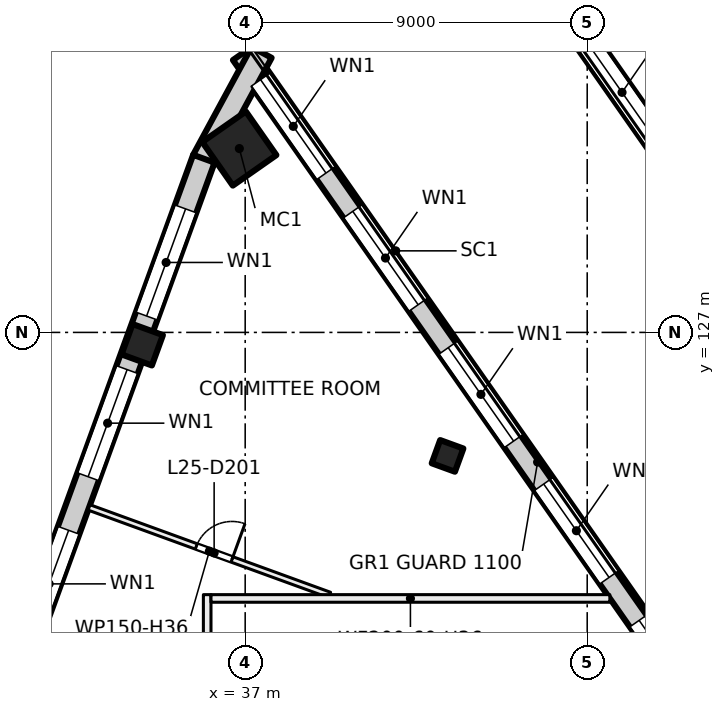
"""IFC4 building model, lengths in metres.
Left out: names, types, materials, properties, quantities, classifications, styles, units other than length and angle.
Written with IfcOpenShell. Run it as: python <this file> out.ifc"""

import sys

from ifc_helpers import new_model, si_unit, direction, frame, frame_2d, origin, origin_2d, place, context, subcontext, project, spatial, rectangle, hollow_rectangle, extrude, element, fill, save


model = new_model("IFC4")
c1 = context("Model", 3, precision=1e-05, world=origin(), true_north=direction((0.0, 1.0)))
c2 = subcontext(c1, "Body", "Model", "MODEL_VIEW")
j1 = project(units=[si_unit("LENGTHUNIT", "METRE"), si_unit("PLANEANGLEUNIT", "RADIAN")], contexts=[c1])
p1 = place(None, origin())
s1 = spatial("IfcSite", under=j1, at=p1, CompositionType="ELEMENT")
p2 = place(p1, origin())
s2 = spatial("IfcBuilding", under=s1, at=p2, CompositionType="ELEMENT")
p3 = place(p2, frame((0.0, 0.0, 109.0)))
s3 = spatial("IfcBuildingStorey", under=s2, at=p3, CompositionType="ELEMENT", Elevation=109.0)
p4 = place(p3, frame((36.846, 131.838, 0.0), z_axis=(0.0, 0.0, 1.0), x_axis=(0.573576436351, -0.819152044289, 0.0)))
e1 = element("IfcColumn", 1, at=p4, inside=s3, PredefinedType="COLUMN", context=c2, shape_type="SweptSolid", body=[
    extrude(hollow_rectangle(XDim=1.4, YDim=1.4, WallThickness=0.04, at=origin_2d()), origin(), (0.0, 0.0, 1.0), 4.0),
])
p5 = place(p3, frame((42.325, 123.751, 0.0), z_axis=(0.0, 0.0, 1.0), x_axis=(-0.342020143326, -0.939692620786, 0.0)))
e2 = element("IfcColumn", 2, at=p5, inside=s3, PredefinedType="COLUMN", context=c2, shape_type="SweptSolid", body=[
    extrude(rectangle(XDim=0.65, YDim=0.65, at=origin_2d()), origin(), (0.0, 0.0, 1.0), 4.0),
])
p6 = place(p3, frame((34.291, 126.675, 0.0), z_axis=(0.0, 0.0, 1.0), x_axis=(-0.342020143326, -0.939692620786, 0.0)))
e3 = element("IfcColumn", 3, at=p6, inside=s3, PredefinedType="COLUMN", context=c2, shape_type="SweptSolid", body=[
    extrude(rectangle(XDim=0.85, YDim=0.85, at=origin_2d()), origin(), (0.0, 0.0, 1.0), 4.0),
])
p7 = place(p3, frame((58.083, 117.369, 0.0), z_axis=(0.0, 0.0, 1.0), x_axis=(-0.573573095716, 0.819154383416, 0.0)))
e4 = element("IfcWall", 4, at=p7, inside=s3, PredefinedType="SOLIDWALL", context=c2, shape_type="SweptSolid", body=[
    extrude(rectangle(XDim=26.037, YDim=0.6, at=frame_2d((13.019, 0.0))), origin(), (0.0, 0.0, 1.0), 3.625),
])
p8 = place(p7, frame((0.6, 0.0, 0.9)))
e5 = element("IfcOpeningElement", 5, at=p8, cuts=e4, PredefinedType="OPENING", context=c2, shape_type="SweptSolid", body=[
    extrude(rectangle(XDim=3.0, YDim=2.4, at=frame_2d((1.5, 1.2))), frame((0.0, 0.31, 0.0), z_axis=(0.0, -1.0, 0.0), x_axis=(1.0, 0.0, 0.0)), (0.0, 0.0, 1.0), 0.62),
])
p9 = place(p7, frame((4.829, 0.0, 0.9)))
e6 = element("IfcOpeningElement", 6, at=p9, cuts=e4, PredefinedType="OPENING", context=c2, shape_type="SweptSolid", body=[
    extrude(rectangle(XDim=3.0, YDim=2.4, at=frame_2d((1.5, 1.2))), frame((0.0, 0.31, 0.0), z_axis=(0.0, -1.0, 0.0), x_axis=(1.0, 0.0, 0.0)), (0.0, 0.0, 1.0), 0.62),
])
p10 = place(p7, frame((9.209, 0.0, 0.9)))
e7 = element("IfcOpeningElement", 7, at=p10, cuts=e4, PredefinedType="OPENING", context=c2, shape_type="SweptSolid", body=[
    extrude(rectangle(XDim=3.0, YDim=2.4, at=frame_2d((1.5, 1.2))), frame((0.0, 0.31, 0.0), z_axis=(0.0, -1.0, 0.0), x_axis=(1.0, 0.0, 0.0)), (0.0, 0.0, 1.0), 0.62),
])
p11 = place(p7, frame((13.588, 0.0, 0.9)))
e8 = element("IfcOpeningElement", 8, at=p11, cuts=e4, PredefinedType="OPENING", context=c2, shape_type="SweptSolid", body=[
    extrude(rectangle(XDim=3.0, YDim=2.4, at=frame_2d((1.5, 1.2))), frame((0.0, 0.31, 0.0), z_axis=(0.0, -1.0, 0.0), x_axis=(1.0, 0.0, 0.0)), (0.0, 0.0, 1.0), 0.62),
])
p12 = place(p7, frame((17.968, 0.0, 0.9)))
e9 = element("IfcOpeningElement", 9, at=p12, cuts=e4, PredefinedType="OPENING", context=c2, shape_type="SweptSolid", body=[
    extrude(rectangle(XDim=3.0, YDim=2.4, at=frame_2d((1.5, 1.2))), frame((0.0, 0.31, 0.0), z_axis=(0.0, -1.0, 0.0), x_axis=(1.0, 0.0, 0.0)), (0.0, 0.0, 1.0), 0.62),
])
p13 = place(p7, frame((22.198, 0.0, 0.9)))
e10 = element("IfcOpeningElement", 10, at=p13, cuts=e4, PredefinedType="OPENING", context=c2, shape_type="SweptSolid", body=[
    extrude(rectangle(XDim=3.0, YDim=2.4, at=frame_2d((1.5, 1.2))), frame((0.0, 0.31, 0.0), z_axis=(0.0, -1.0, 0.0), x_axis=(1.0, 0.0, 0.0)), (0.0, 0.0, 1.0), 0.62),
])
p14 = place(p3, frame((36.923, 134.338, 0.0), z_axis=(0.0, 0.0, 1.0), x_axis=(0.573575266068, -0.819152863729, 0.0)))
e11 = element("IfcWall", 11, at=p14, inside=s3, PredefinedType="SOLIDWALL", context=c2, shape_type="SweptSolid", body=[
    extrude(rectangle(XDim=26.117, YDim=0.6, at=frame_2d((13.059, 0.0))), origin(), (0.0, 0.0, 1.0), 3.625),
])
p15 = place(p14, frame((0.84, 0.0, 0.9)))
e12 = element("IfcOpeningElement", 12, at=p15, cuts=e11, PredefinedType="OPENING", context=c2, shape_type="SweptSolid", body=[
    extrude(rectangle(XDim=3.0, YDim=2.4, at=frame_2d((1.5, 1.2))), frame((0.0, 0.31, 0.0), z_axis=(0.0, -1.0, 0.0), x_axis=(1.0, 0.0, 0.0)), (0.0, 0.0, 1.0), 0.62),
])
p16 = place(p14, frame((5.069, 0.0, 0.9)))
e13 = element("IfcOpeningElement", 13, at=p16, cuts=e11, PredefinedType="OPENING", context=c2, shape_type="SweptSolid", body=[
    extrude(rectangle(XDim=3.0, YDim=2.4, at=frame_2d((1.5, 1.2))), frame((0.0, 0.31, 0.0), z_axis=(0.0, -1.0, 0.0), x_axis=(1.0, 0.0, 0.0)), (0.0, 0.0, 1.0), 0.62),
])
p17 = place(p14, frame((9.449, 0.0, 0.9)))
e14 = element("IfcOpeningElement", 14, at=p17, cuts=e11, PredefinedType="OPENING", context=c2, shape_type="SweptSolid", body=[
    extrude(rectangle(XDim=3.0, YDim=2.4, at=frame_2d((1.5, 1.2))), frame((0.0, 0.31, 0.0), z_axis=(0.0, -1.0, 0.0), x_axis=(1.0, 0.0, 0.0)), (0.0, 0.0, 1.0), 0.62),
])
p18 = place(p14, frame((13.829, 0.0, 0.9)))
e15 = element("IfcOpeningElement", 15, at=p18, cuts=e11, PredefinedType="OPENING", context=c2, shape_type="SweptSolid", body=[
    extrude(rectangle(XDim=3.0, YDim=2.4, at=frame_2d((1.5, 1.2))), frame((0.0, 0.31, 0.0), z_axis=(0.0, -1.0, 0.0), x_axis=(1.0, 0.0, 0.0)), (0.0, 0.0, 1.0), 0.62),
])
p19 = place(p14, frame((18.208, 0.0, 0.9)))
e16 = element("IfcOpeningElement", 16, at=p19, cuts=e11, PredefinedType="OPENING", context=c2, shape_type="SweptSolid", body=[
    extrude(rectangle(XDim=3.0, YDim=2.4, at=frame_2d((1.5, 1.2))), frame((0.0, 0.31, 0.0), z_axis=(0.0, -1.0, 0.0), x_axis=(1.0, 0.0, 0.0)), (0.0, 0.0, 1.0), 0.62),
])
p20 = place(p14, frame((22.438, 0.0, 0.9)))
e17 = element("IfcOpeningElement", 17, at=p20, cuts=e11, PredefinedType="OPENING", context=c2, shape_type="SweptSolid", body=[
    extrude(rectangle(XDim=3.0, YDim=2.4, at=frame_2d((1.5, 1.2))), frame((0.0, 0.31, 0.0), z_axis=(0.0, -1.0, 0.0), x_axis=(1.0, 0.0, 0.0)), (0.0, 0.0, 1.0), 0.62),
])
p21 = place(p3, frame((35.895, 131.53, 0.0), z_axis=(0.0, 0.0, 1.0), x_axis=(0.476529237666, 0.879158623713, 0.0)))
e18 = element("IfcWall", 18, at=p21, inside=s3, PredefinedType="SOLIDWALL", context=c2, shape_type="SweptSolid", body=[
    extrude(rectangle(XDim=3.228, YDim=0.6, at=frame_2d((1.614, 0.0))), origin(), (0.0, 0.0, 1.0), 3.625),
])
p22 = place(p3, frame((24.666, 100.669, 0.0), z_axis=(0.0, 0.0, 1.0), x_axis=(0.34201964167, 0.939692803373, 0.0)))
e19 = element("IfcWall", 19, at=p22, inside=s3, PredefinedType="SOLIDWALL", context=c2, shape_type="SweptSolid", body=[
    extrude(rectangle(XDim=32.884, YDim=0.6, at=frame_2d((16.442, 0.0))), origin(), (0.0, 0.0, 1.0), 3.625),
])
p23 = place(p22, frame((1.48, 0.0, 0.9)))
e20 = element("IfcOpeningElement", 20, at=p23, cuts=e19, PredefinedType="OPENING", context=c2, shape_type="SweptSolid", body=[
    extrude(rectangle(XDim=3.0, YDim=2.4, at=frame_2d((1.5, 1.2))), frame((0.0, 0.31, 0.0), z_axis=(0.0, -1.0, 0.0), x_axis=(1.0, 0.0, 0.0)), (0.0, 0.0, 1.0), 0.62),
])
p24 = place(p22, frame((5.98, 0.0, 0.9)))
e21 = element("IfcOpeningElement", 21, at=p24, cuts=e19, PredefinedType="OPENING", context=c2, shape_type="SweptSolid", body=[
    extrude(rectangle(XDim=3.0, YDim=2.4, at=frame_2d((1.5, 1.2))), frame((0.0, 0.31, 0.0), z_axis=(0.0, -1.0, 0.0), x_axis=(1.0, 0.0, 0.0)), (0.0, 0.0, 1.0), 0.62),
])
p25 = place(p22, frame((10.48, 0.0, 0.9)))
e22 = element("IfcOpeningElement", 22, at=p25, cuts=e19, PredefinedType="OPENING", context=c2, shape_type="SweptSolid", body=[
    extrude(rectangle(XDim=3.0, YDim=2.4, at=frame_2d((1.5, 1.2))), frame((0.0, 0.31, 0.0), z_axis=(0.0, -1.0, 0.0), x_axis=(1.0, 0.0, 0.0)), (0.0, 0.0, 1.0), 0.62),
])
p26 = place(p22, frame((14.98, 0.0, 0.9)))
e23 = element("IfcOpeningElement", 23, at=p26, cuts=e19, PredefinedType="OPENING", context=c2, shape_type="SweptSolid", body=[
    extrude(rectangle(XDim=3.0, YDim=2.4, at=frame_2d((1.5, 1.2))), frame((0.0, 0.31, 0.0), z_axis=(0.0, -1.0, 0.0), x_axis=(1.0, 0.0, 0.0)), (0.0, 0.0, 1.0), 0.62),
])
p27 = place(p22, frame((19.48, 0.0, 0.9)))
e24 = element("IfcOpeningElement", 24, at=p27, cuts=e19, PredefinedType="OPENING", context=c2, shape_type="SweptSolid", body=[
    extrude(rectangle(XDim=3.0, YDim=2.4, at=frame_2d((1.5, 1.2))), frame((0.0, 0.31, 0.0), z_axis=(0.0, -1.0, 0.0), x_axis=(1.0, 0.0, 0.0)), (0.0, 0.0, 1.0), 0.62),
])
p28 = place(p22, frame((23.98, 0.0, 0.9)))
e25 = element("IfcOpeningElement", 25, at=p28, cuts=e19, PredefinedType="OPENING", context=c2, shape_type="SweptSolid", body=[
    extrude(rectangle(XDim=3.0, YDim=2.4, at=frame_2d((1.5, 1.2))), frame((0.0, 0.31, 0.0), z_axis=(0.0, -1.0, 0.0), x_axis=(1.0, 0.0, 0.0)), (0.0, 0.0, 1.0), 0.62),
])
p29 = place(p22, frame((28.48, 0.0, 0.9)))
e26 = element("IfcOpeningElement", 26, at=p29, cuts=e19, PredefinedType="OPENING", context=c2, shape_type="SweptSolid", body=[
    extrude(rectangle(XDim=3.0, YDim=2.4, at=frame_2d((1.5, 1.2))), frame((0.0, 0.31, 0.0), z_axis=(0.0, -1.0, 0.0), x_axis=(1.0, 0.0, 0.0)), (0.0, 0.0, 1.0), 0.62),
])
p30 = place(p3, frame((39.223, 120.091, 0.0), z_axis=(0.0, 0.0, 1.0), x_axis=(-0.939705573142, 0.341984554924, 0.0)))
e27 = element("IfcWall", 27, at=p30, inside=s3, PredefinedType="PARTITIONING", context=c2, shape_type="SweptSolid", body=[
    extrude(rectangle(XDim=6.737, YDim=0.15, at=frame_2d((3.369, 0.0))), origin(), (0.0, 0.0, 1.0), 3.625),
])
p31 = place(p30, frame((2.735, 0.0, 0.0)))
e28 = element("IfcOpeningElement", 28, at=p31, cuts=e27, PredefinedType="OPENING", context=c2, shape_type="SweptSolid", body=[
    extrude(rectangle(XDim=1.0, YDim=2.1, at=frame_2d((0.5, 1.05))), frame((0.0, 0.085, 0.0), z_axis=(0.0, -1.0, 0.0), x_axis=(1.0, 0.0, 0.0)), (0.0, 0.0, 1.0), 0.17),
])
p32 = place(p3, frame((36.0, 115.9, 0.0), z_axis=(0.0, 0.0, 1.0), x_axis=(0.0, 1.0, 0.0)))
e29 = element("IfcWall", 29, at=p32, inside=s3, PredefinedType="PARTITIONING", context=c2, shape_type="SweptSolid", body=[
    extrude(rectangle(XDim=4.2, YDim=0.2, at=frame_2d((2.1, 0.0))), origin(), (0.0, 0.0, 1.0), 3.625),
])
p33 = place(p3, frame((36.1, 120.0, 0.0), z_axis=(0.0, 0.0, 1.0), x_axis=(1.0, 0.0, 0.0)))
e30 = element("IfcWall", 30, at=p33, inside=s3, PredefinedType="PARTITIONING", context=c2, shape_type="SweptSolid", body=[
    extrude(rectangle(XDim=10.496, YDim=0.2, at=frame_2d((5.248, 0.0))), origin(), (0.0, 0.0, 1.0), 3.625),
])
p34 = place(p12, origin())
e31 = element("IfcWindow", 31, at=p34, inside=s3, PartitioningType="SINGLE_PANEL", PredefinedType="WINDOW", context=c2, shape_type="SweptSolid", body=[
    extrude(rectangle(XDim=3.0, YDim=2.4, at=frame_2d((1.5, 1.2))), frame((0.0, 0.03, 0.0), z_axis=(0.0, -1.0, 0.0), x_axis=(1.0, 0.0, 0.0)), (0.0, 0.0, 1.0), 0.06),
])
fill(e9, e31)
p35 = place(p15, origin())
e32 = element("IfcWindow", 32, at=p35, inside=s3, PartitioningType="SINGLE_PANEL", PredefinedType="WINDOW", context=c2, shape_type="SweptSolid", body=[
    extrude(rectangle(XDim=3.0, YDim=2.4, at=frame_2d((1.5, 1.2))), frame((0.0, 0.03, 0.0), z_axis=(0.0, -1.0, 0.0), x_axis=(1.0, 0.0, 0.0)), (0.0, 0.0, 1.0), 0.06),
])
fill(e12, e32)
p36 = place(p16, origin())
e33 = element("IfcWindow", 33, at=p36, inside=s3, PartitioningType="SINGLE_PANEL", PredefinedType="WINDOW", context=c2, shape_type="SweptSolid", body=[
    extrude(rectangle(XDim=3.0, YDim=2.4, at=frame_2d((1.5, 1.2))), frame((0.0, 0.03, 0.0), z_axis=(0.0, -1.0, 0.0), x_axis=(1.0, 0.0, 0.0)), (0.0, 0.0, 1.0), 0.06),
])
fill(e13, e33)
p37 = place(p17, origin())
e34 = element("IfcWindow", 34, at=p37, inside=s3, PartitioningType="SINGLE_PANEL", PredefinedType="WINDOW", context=c2, shape_type="SweptSolid", body=[
    extrude(rectangle(XDim=3.0, YDim=2.4, at=frame_2d((1.5, 1.2))), frame((0.0, 0.03, 0.0), z_axis=(0.0, -1.0, 0.0), x_axis=(1.0, 0.0, 0.0)), (0.0, 0.0, 1.0), 0.06),
])
fill(e14, e34)
p38 = place(p18, origin())
e35 = element("IfcWindow", 35, at=p38, inside=s3, PartitioningType="SINGLE_PANEL", PredefinedType="WINDOW", context=c2, shape_type="SweptSolid", body=[
    extrude(rectangle(XDim=3.0, YDim=2.4, at=frame_2d((1.5, 1.2))), frame((0.0, 0.03, 0.0), z_axis=(0.0, -1.0, 0.0), x_axis=(1.0, 0.0, 0.0)), (0.0, 0.0, 1.0), 0.06),
])
fill(e15, e35)
p39 = place(p19, origin())
e36 = element("IfcWindow", 36, at=p39, inside=s3, PartitioningType="SINGLE_PANEL", PredefinedType="WINDOW", context=c2, shape_type="SweptSolid", body=[
    extrude(rectangle(XDim=3.0, YDim=2.4, at=frame_2d((1.5, 1.2))), frame((0.0, 0.03, 0.0), z_axis=(0.0, -1.0, 0.0), x_axis=(1.0, 0.0, 0.0)), (0.0, 0.0, 1.0), 0.06),
])
fill(e16, e36)
p40 = place(p27, origin())
e37 = element("IfcWindow", 37, at=p40, inside=s3, PartitioningType="SINGLE_PANEL", PredefinedType="WINDOW", context=c2, shape_type="SweptSolid", body=[
    extrude(rectangle(XDim=3.0, YDim=2.4, at=frame_2d((1.5, 1.2))), frame((0.0, 0.03, 0.0), z_axis=(0.0, -1.0, 0.0), x_axis=(1.0, 0.0, 0.0)), (0.0, 0.0, 1.0), 0.06),
])
fill(e24, e37)
p41 = place(p28, origin())
e38 = element("IfcWindow", 38, at=p41, inside=s3, PartitioningType="SINGLE_PANEL", PredefinedType="WINDOW", context=c2, shape_type="SweptSolid", body=[
    extrude(rectangle(XDim=3.0, YDim=2.4, at=frame_2d((1.5, 1.2))), frame((0.0, 0.03, 0.0), z_axis=(0.0, -1.0, 0.0), x_axis=(1.0, 0.0, 0.0)), (0.0, 0.0, 1.0), 0.06),
])
fill(e25, e38)
p42 = place(p29, origin())
e39 = element("IfcWindow", 39, at=p42, inside=s3, PartitioningType="SINGLE_PANEL", PredefinedType="WINDOW", context=c2, shape_type="SweptSolid", body=[
    extrude(rectangle(XDim=3.0, YDim=2.4, at=frame_2d((1.5, 1.2))), frame((0.0, 0.03, 0.0), z_axis=(0.0, -1.0, 0.0), x_axis=(1.0, 0.0, 0.0)), (0.0, 0.0, 1.0), 0.06),
])
fill(e26, e39)
p43 = place(p31, origin())
e40 = element("IfcDoor", 40, at=p43, inside=s3, OperationType="SINGLE_SWING_LEFT", PredefinedType="DOOR", context=c2, shape_type="SweptSolid", body=[
    extrude(rectangle(XDim=1.0, YDim=2.1, at=frame_2d((0.5, 1.05))), frame((0.0, 0.025, 0.0), z_axis=(0.0, -1.0, 0.0), x_axis=(1.0, 0.0, 0.0)), (0.0, 0.0, 1.0), 0.05),
])
fill(e28, e40)
save(model, sys.argv[1])
